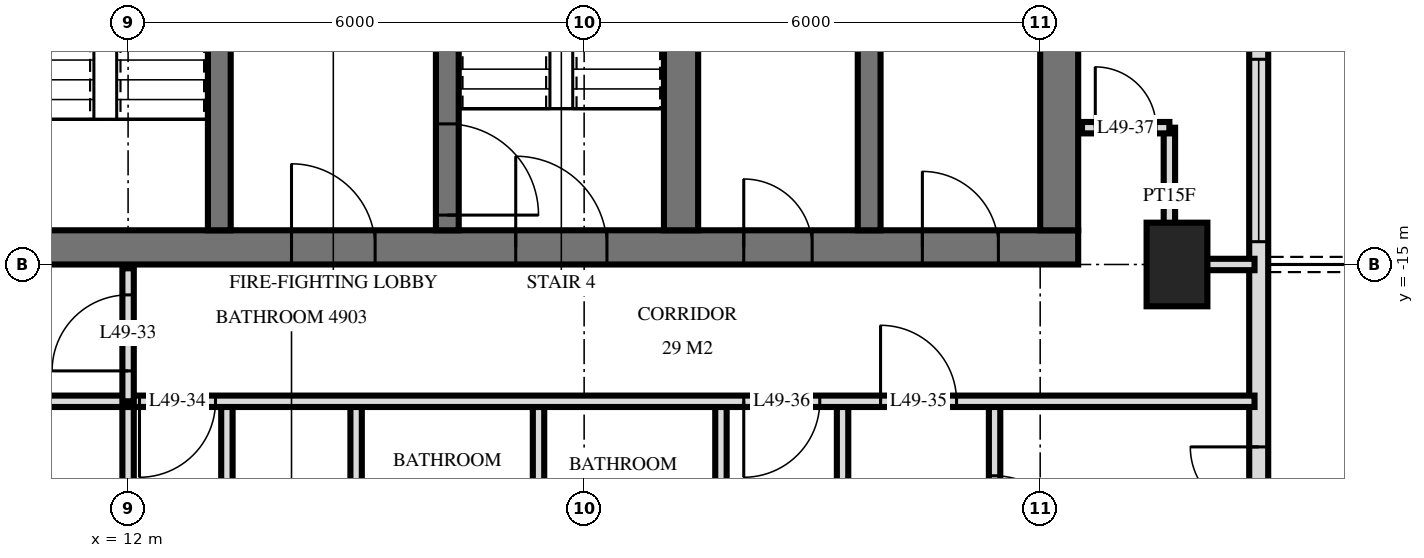
"""IFC4 building model, lengths in metres.
Left out: names, types, materials, properties, quantities, classifications, styles, units other than length and angle.
Written with IfcOpenShell. Run it as: python <this file> out.ifc"""

import sys

from ifc_helpers import new_model, si_unit, direction, frame, frame_2d, origin, origin_2d, place, context, subcontext, project, spatial, rectangle, extrude, element, fill, save


model = new_model("IFC4")
c1 = context("Model", 3, precision=1e-05, world=origin(), true_north=direction((0.0, 1.0)))
c2 = subcontext(c1, "Body", "Model", "MODEL_VIEW")
j1 = project(units=[si_unit("LENGTHUNIT", "METRE"), si_unit("PLANEANGLEUNIT", "RADIAN")], contexts=[c1])
p1 = place(None, origin())
s1 = spatial("IfcSite", under=j1, at=p1, CompositionType="ELEMENT")
p2 = place(p1, origin())
s2 = spatial("IfcBuilding", under=s1, at=p2, CompositionType="ELEMENT")
p3 = place(p2, frame((0.0, 0.0, 190.6)))
s3 = spatial("IfcBuildingStorey", under=s2, at=p3, CompositionType="ELEMENT", Elevation=190.6)
p4 = place(p3, frame((25.8, -15.0, 0.0), z_axis=(0.0, 0.0, 1.0), x_axis=(0.0, 1.0, 0.0)))
e1 = element("IfcColumn", 1, at=p4, inside=s3, PredefinedType="COLUMN", context=c2, shape_type="SweptSolid", body=[
    extrude(rectangle(XDim=1.1, YDim=0.8, at=origin_2d()), origin(), (0.0, 0.0, 1.0), 3.5),
])
p5 = place(p3, frame((10.0, -14.775, 0.0), z_axis=(0.0, 0.0, 1.0), x_axis=(1.0, 0.0, 0.0)))
e2 = element("IfcWall", 2, at=p5, inside=s3, PredefinedType="SHEAR", context=c2, shape_type="SweptSolid", body=[
    extrude(rectangle(XDim=14.5, YDim=0.45, at=frame_2d((7.25, 0.0))), origin(), (0.0, 0.0, 1.0), 3.5),
])
p6 = place(p5, frame((7.1, 0.0, 0.0)))
e3 = element("IfcOpeningElement", 3, at=p6, cuts=e2, PredefinedType="OPENING", context=c2, shape_type="SweptSolid", body=[
    extrude(rectangle(XDim=1.2, YDim=2.1, at=frame_2d((0.6, 1.05))), frame((0.0, 0.235, 0.0), z_axis=(0.0, -1.0, 0.0), x_axis=(1.0, 0.0, 0.0)), (0.0, 0.0, 1.0), 0.47),
])
p7 = place(p5, frame((4.15, 0.0, 0.0)))
e4 = element("IfcOpeningElement", 4, at=p7, cuts=e2, PredefinedType="OPENING", context=c2, shape_type="SweptSolid", body=[
    extrude(rectangle(XDim=1.1, YDim=2.1, at=frame_2d((0.55, 1.05))), frame((0.0, 0.235, 0.0), z_axis=(0.0, -1.0, 0.0), x_axis=(1.0, 0.0, 0.0)), (0.0, 0.0, 1.0), 0.47),
])
p8 = place(p5, frame((10.1, 0.0, 0.0)))
e5 = element("IfcOpeningElement", 5, at=p8, cuts=e2, PredefinedType="OPENING", context=c2, shape_type="SweptSolid", body=[
    extrude(rectangle(XDim=0.9, YDim=2.1, at=frame_2d((0.45, 1.05))), frame((0.0, 0.235, 0.0), z_axis=(0.0, -1.0, 0.0), x_axis=(1.0, 0.0, 0.0)), (0.0, 0.0, 1.0), 0.47),
])
p9 = place(p5, frame((12.45, 0.0, 0.0)))
e6 = element("IfcOpeningElement", 6, at=p9, cuts=e2, PredefinedType="OPENING", context=c2, shape_type="SweptSolid", body=[
    extrude(rectangle(XDim=1.0, YDim=2.1, at=frame_2d((0.5, 1.05))), frame((0.0, 0.235, 0.0), z_axis=(0.0, -1.0, 0.0), x_axis=(1.0, 0.0, 0.0)), (0.0, 0.0, 1.0), 0.47),
])
p10 = place(p3, frame((24.25, -14.55, 0.0), z_axis=(0.0, 0.0, 1.0), x_axis=(0.0, 1.0, 0.0)))
e7 = element("IfcWall", 7, at=p10, inside=s3, PredefinedType="SHEAR", context=c2, shape_type="SweptSolid", body=[
    extrude(rectangle(XDim=14.1, YDim=0.5, at=frame_2d((7.05, 0.0))), origin(), (0.0, 0.0, 1.0), 3.5),
])
p11 = place(p3, frame((13.2, -14.55, 0.0), z_axis=(0.0, 0.0, 1.0), x_axis=(0.0, 1.0, 0.0)))
e8 = element("IfcWall", 8, at=p11, inside=s3, PredefinedType="SHEAR", context=c2, shape_type="SweptSolid", body=[
    extrude(rectangle(XDim=5.4, YDim=0.3, at=frame_2d((2.7, 0.0))), origin(), (0.0, 0.0, 1.0), 3.5),
])
p12 = place(p11, frame((4.0, 0.0, 0.0)))
e9 = element("IfcOpeningElement", 9, at=p12, cuts=e8, PredefinedType="OPENING", context=c2, shape_type="SweptSolid", body=[
    extrude(rectangle(XDim=1.2, YDim=2.1, at=frame_2d((0.6, 1.05))), frame((0.0, 0.16, 0.0), z_axis=(0.0, -1.0, 0.0), x_axis=(1.0, 0.0, 0.0)), (0.0, 0.0, 1.0), 0.32),
])
p13 = place(p3, frame((16.2, -14.55, 0.0), z_axis=(0.0, 0.0, 1.0), x_axis=(0.0, 1.0, 0.0)))
e10 = element("IfcWall", 10, at=p13, inside=s3, PredefinedType="SHEAR", context=c2, shape_type="SweptSolid", body=[
    extrude(rectangle(XDim=5.4, YDim=0.3, at=frame_2d((2.7, 0.0))), origin(), (0.0, 0.0, 1.0), 3.5),
])
p14 = place(p13, frame((0.2, 0.0, 0.0)))
e11 = element("IfcOpeningElement", 11, at=p14, cuts=e10, PredefinedType="OPENING", context=c2, shape_type="SweptSolid", body=[
    extrude(rectangle(XDim=1.2, YDim=2.1, at=frame_2d((0.6, 1.05))), frame((0.0, 0.16, 0.0), z_axis=(0.0, -1.0, 0.0), x_axis=(1.0, 0.0, 0.0)), (0.0, 0.0, 1.0), 0.32),
])
p15 = place(p3, frame((19.275, -14.55, 0.0), z_axis=(0.0, 0.0, 1.0), x_axis=(0.0, 1.0, 0.0)))
e12 = element("IfcWall", 12, at=p15, inside=s3, PredefinedType="SHEAR", context=c2, shape_type="SweptSolid", body=[
    extrude(rectangle(XDim=5.4, YDim=0.45, at=frame_2d((2.7, 0.0))), origin(), (0.0, 0.0, 1.0), 3.5),
])
p16 = place(p3, frame((21.75, -14.55, 0.0), z_axis=(0.0, 0.0, 1.0), x_axis=(0.0, 1.0, 0.0)))
e13 = element("IfcWall", 13, at=p16, inside=s3, PredefinedType="SHEAR", context=c2, shape_type="SweptSolid", body=[
    extrude(rectangle(XDim=5.4, YDim=0.3, at=frame_2d((2.7, 0.0))), origin(), (0.0, 0.0, 1.0), 3.5),
])
p17 = place(p3, frame((26.875, -24.875, 0.0), z_axis=(0.0, 0.0, 1.0), x_axis=(0.0, 1.0, 0.0)))
e14 = element("IfcWall", 14, at=p17, inside=s3, PredefinedType="SOLIDWALL", context=c2, shape_type="SweptSolid", body=[
    extrude(rectangle(XDim=21.551, YDim=0.25, at=frame_2d((10.775, 0.0))), origin(), (0.0, 0.0, 1.0), 3.22),
])
p18 = place(p17, frame((0.575, 0.0, 0.0)))
e15 = element("IfcOpeningElement", 15, at=p18, cuts=e14, PredefinedType="OPENING", context=c2, shape_type="SweptSolid", body=[
    extrude(rectangle(XDim=1.8, YDim=2.4, at=frame_2d((0.9, 1.2))), frame((0.0, 0.135, 0.0), z_axis=(0.0, -1.0, 0.0), x_axis=(1.0, 0.0, 0.0)), (0.0, 0.0, 1.0), 0.27),
])
p19 = place(p17, frame((5.675, 0.0, 0.0)))
e16 = element("IfcOpeningElement", 16, at=p19, cuts=e14, PredefinedType="OPENING", context=c2, shape_type="SweptSolid", body=[
    extrude(rectangle(XDim=1.8, YDim=2.4, at=frame_2d((0.9, 1.2))), frame((0.0, 0.135, 0.0), z_axis=(0.0, -1.0, 0.0), x_axis=(1.0, 0.0, 0.0)), (0.0, 0.0, 1.0), 0.27),
])
p20 = place(p17, frame((10.175, 0.0, 0.9)))
e17 = element("IfcOpeningElement", 17, at=p20, cuts=e14, PredefinedType="OPENING", context=c2, shape_type="SweptSolid", body=[
    extrude(rectangle(XDim=2.4, YDim=1.5, at=frame_2d((1.2, 0.75))), frame((0.0, 0.135, 0.0), z_axis=(0.0, -1.0, 0.0), x_axis=(1.0, 0.0, 0.0)), (0.0, 0.0, 1.0), 0.27),
])
p21 = place(p17, frame((13.475, 0.0, 0.0)))
e18 = element("IfcOpeningElement", 18, at=p21, cuts=e14, PredefinedType="OPENING", context=c2, shape_type="SweptSolid", body=[
    extrude(rectangle(XDim=1.8, YDim=2.4, at=frame_2d((0.9, 1.2))), frame((0.0, 0.135, 0.0), z_axis=(0.0, -1.0, 0.0), x_axis=(1.0, 0.0, 0.0)), (0.0, 0.0, 1.0), 0.27),
])
p22 = place(p3, frame((25.7, -15.0, 0.0), z_axis=(0.0, 0.0, 1.0), x_axis=(0.0, 1.0, 0.0)))
e19 = element("IfcWall", 19, at=p22, inside=s3, PredefinedType="PARTITIONING", context=c2, shape_type="SweptSolid", body=[
    extrude(rectangle(XDim=1.8, YDim=0.15, at=frame_2d((0.9, 0.0))), origin(), (0.0, 0.0, 1.0), 3.22),
])
p23 = place(p3, frame((23.4, -19.8, 0.0), z_axis=(0.0, 0.0, 1.0), x_axis=(0.0, 1.0, 0.0)))
e20 = element("IfcWall", 20, at=p23, inside=s3, PredefinedType="PARTITIONING", context=c2, shape_type="SweptSolid", body=[
    extrude(rectangle(XDim=3.0, YDim=0.15, at=frame_2d((1.5, 0.0))), origin(), (0.0, 0.0, 1.0), 3.22),
])
p24 = place(p23, frame((1.02, 0.0, 0.0)))
e21 = element("IfcOpeningElement", 21, at=p24, cuts=e20, PredefinedType="OPENING", context=c2, shape_type="SweptSolid", body=[
    extrude(rectangle(XDim=1.0, YDim=2.1, at=frame_2d((0.5, 1.05))), frame((0.0, 0.085, 0.0), z_axis=(0.0, -1.0, 0.0), x_axis=(1.0, 0.0, 0.0)), (0.0, 0.0, 1.0), 0.17),
])
for number, where, z_axis, x_axis in (
    (22, (21.4, -19.8, 0.0), (0.0, 0.0, 1.0), (0.0, 1.0, 0.0)),
    (23, (19.8, -19.8, 0.0), (0.0, 0.0, 1.0), (0.0, 1.0, 0.0)),
    (24, (17.4, -19.8, 0.0), (0.0, 0.0, 1.0), (0.0, 1.0, 0.0)),
):
    element("IfcWall", number, at=place(p3, frame(where, z_axis=z_axis, x_axis=x_axis)), inside=s3, PredefinedType="PARTITIONING", context=c2, shape_type="SweptSolid", body=[
        extrude(rectangle(XDim=3.0, YDim=0.15, at=frame_2d((1.5, 0.0))), origin(), (0.0, 0.0, 1.0), 3.22),
    ])
p25 = place(p3, frame((15.0, -29.22, 0.0), z_axis=(0.0, 0.0, 1.0), x_axis=(0.0, 1.0, 0.0)))
e25 = element("IfcWall", 25, at=p25, inside=s3, PredefinedType="PARTITIONING", context=c2, shape_type="SweptSolid", body=[
    extrude(rectangle(XDim=12.42, YDim=0.15, at=frame_2d((6.21, 0.0))), origin(), (0.0, 0.0, 1.0), 3.22),
])
p26 = place(p3, frame((13.3, -19.8, 0.0), z_axis=(0.0, 0.0, 1.0), x_axis=(0.0, 1.0, 0.0)))
e26 = element("IfcWall", 26, at=p26, inside=s3, PredefinedType="PARTITIONING", context=c2, shape_type="SweptSolid", body=[
    extrude(rectangle(XDim=3.0, YDim=0.15, at=frame_2d((1.5, 0.0))), origin(), (0.0, 0.0, 1.0), 3.22),
])
p27 = place(p26, frame((1.1, 0.0, 0.0)))
e27 = element("IfcOpeningElement", 27, at=p27, cuts=e26, PredefinedType="OPENING", context=c2, shape_type="SweptSolid", body=[
    extrude(rectangle(XDim=0.8, YDim=2.1, at=frame_2d((0.4, 1.05))), frame((0.0, 0.085, 0.0), z_axis=(0.0, -1.0, 0.0), x_axis=(1.0, 0.0, 0.0)), (0.0, 0.0, 1.0), 0.17),
])
p28 = place(p3, frame((12.0, -16.8, 0.0), z_axis=(0.0, 0.0, 1.0), x_axis=(0.0, 1.0, 0.0)))
e28 = element("IfcWall", 28, at=p28, inside=s3, PredefinedType="PARTITIONING", context=c2, shape_type="SweptSolid", body=[
    extrude(rectangle(XDim=1.75, YDim=0.15, at=frame_2d((0.875, 0.0))), origin(), (0.0, 0.0, 1.0), 3.22),
])
p29 = place(p28, frame((0.4, 0.0, 0.0)))
e29 = element("IfcOpeningElement", 29, at=p29, cuts=e28, PredefinedType="OPENING", context=c2, shape_type="SweptSolid", body=[
    extrude(rectangle(XDim=1.0, YDim=2.1, at=frame_2d((0.5, 1.05))), frame((0.0, 0.085, 0.0), z_axis=(0.0, -1.0, 0.0), x_axis=(1.0, 0.0, 0.0)), (0.0, 0.0, 1.0), 0.17),
])
p30 = place(p3, frame((12.0, -29.22, 0.0), z_axis=(0.0, 0.0, 1.0), x_axis=(0.0, 1.0, 0.0)))
e30 = element("IfcWall", 30, at=p30, inside=s3, PredefinedType="PARTITIONING", context=c2, shape_type="SweptSolid", body=[
    extrude(rectangle(XDim=12.42, YDim=0.15, at=frame_2d((6.21, 0.0))), origin(), (0.0, 0.0, 1.0), 3.22),
])
p31 = place(p3, frame((-26.82, -16.8, 0.0), z_axis=(0.0, 0.0, 1.0), x_axis=(1.0, 0.0, 0.0)))
e31 = element("IfcWall", 31, at=p31, inside=s3, PredefinedType="PARTITIONING", context=c2, shape_type="SweptSolid", body=[
    extrude(rectangle(XDim=53.64, YDim=0.15, at=frame_2d((26.82, 0.0))), origin(), (0.0, 0.0, 1.0), 3.22),
])
p32 = place(p31, frame((11.97, 0.0, 0.0)))
e32 = element("IfcOpeningElement", 32, at=p32, cuts=e31, PredefinedType="OPENING", context=c2, shape_type="SweptSolid", body=[
    extrude(rectangle(XDim=1.0, YDim=2.1, at=frame_2d((0.5, 1.05))), frame((0.0, 0.085, 0.0), z_axis=(0.0, -1.0, 0.0), x_axis=(1.0, 0.0, 0.0)), (0.0, 0.0, 1.0), 0.17),
])
p33 = place(p31, frame((10.67, 0.0, 0.0)))
e33 = element("IfcOpeningElement", 33, at=p33, cuts=e31, PredefinedType="OPENING", context=c2, shape_type="SweptSolid", body=[
    extrude(rectangle(XDim=1.0, YDim=2.1, at=frame_2d((0.5, 1.05))), frame((0.0, 0.085, 0.0), z_axis=(0.0, -1.0, 0.0), x_axis=(1.0, 0.0, 0.0)), (0.0, 0.0, 1.0), 0.17),
])
p34 = place(p31, frame((3.22, 0.0, 0.0)))
e34 = element("IfcOpeningElement", 34, at=p34, cuts=e31, PredefinedType="OPENING", context=c2, shape_type="SweptSolid", body=[
    extrude(rectangle(XDim=1.0, YDim=2.1, at=frame_2d((0.5, 1.05))), frame((0.0, 0.085, 0.0), z_axis=(0.0, -1.0, 0.0), x_axis=(1.0, 0.0, 0.0)), (0.0, 0.0, 1.0), 0.17),
])
p35 = place(p31, frame((5.02, 0.0, 0.0)))
e35 = element("IfcOpeningElement", 35, at=p35, cuts=e31, PredefinedType="OPENING", context=c2, shape_type="SweptSolid", body=[
    extrude(rectangle(XDim=1.0, YDim=2.1, at=frame_2d((0.5, 1.05))), frame((0.0, 0.085, 0.0), z_axis=(0.0, -1.0, 0.0), x_axis=(1.0, 0.0, 0.0)), (0.0, 0.0, 1.0), 0.17),
])
p36 = place(p31, frame((38.97, 0.0, 0.0)))
e36 = element("IfcOpeningElement", 36, at=p36, cuts=e31, PredefinedType="OPENING", context=c2, shape_type="SweptSolid", body=[
    extrude(rectangle(XDim=1.0, YDim=2.1, at=frame_2d((0.5, 1.05))), frame((0.0, 0.085, 0.0), z_axis=(0.0, -1.0, 0.0), x_axis=(1.0, 0.0, 0.0)), (0.0, 0.0, 1.0), 0.17),
])
p37 = place(p31, frame((48.72, 0.0, 0.0)))
e37 = element("IfcOpeningElement", 37, at=p37, cuts=e31, PredefinedType="OPENING", context=c2, shape_type="SweptSolid", body=[
    extrude(rectangle(XDim=1.0, YDim=2.1, at=frame_2d((0.5, 1.05))), frame((0.0, 0.085, 0.0), z_axis=(0.0, -1.0, 0.0), x_axis=(1.0, 0.0, 0.0)), (0.0, 0.0, 1.0), 0.17),
])
p38 = place(p31, frame((46.92, 0.0, 0.0)))
e38 = element("IfcOpeningElement", 38, at=p38, cuts=e31, PredefinedType="OPENING", context=c2, shape_type="SweptSolid", body=[
    extrude(rectangle(XDim=1.0, YDim=2.1, at=frame_2d((0.5, 1.05))), frame((0.0, 0.085, 0.0), z_axis=(0.0, -1.0, 0.0), x_axis=(1.0, 0.0, 0.0)), (0.0, 0.0, 1.0), 0.17),
])
p39 = place(p31, frame((18.32, 0.0, 0.0)))
e39 = element("IfcOpeningElement", 39, at=p39, cuts=e31, PredefinedType="OPENING", context=c2, shape_type="SweptSolid", body=[
    extrude(rectangle(XDim=1.0, YDim=2.1, at=frame_2d((0.5, 1.05))), frame((0.0, 0.085, 0.0), z_axis=(0.0, -1.0, 0.0), x_axis=(1.0, 0.0, 0.0)), (0.0, 0.0, 1.0), 0.17),
])
p40 = place(p31, frame((26.32, 0.0, 0.0)))
e40 = element("IfcOpeningElement", 40, at=p40, cuts=e31, PredefinedType="OPENING", context=c2, shape_type="SweptSolid", body=[
    extrude(rectangle(XDim=1.0, YDim=2.1, at=frame_2d((0.5, 1.05))), frame((0.0, 0.085, 0.0), z_axis=(0.0, -1.0, 0.0), x_axis=(1.0, 0.0, 0.0)), (0.0, 0.0, 1.0), 0.17),
])
p41 = place(p31, frame((34.32, 0.0, 0.0)))
e41 = element("IfcOpeningElement", 41, at=p41, cuts=e31, PredefinedType="OPENING", context=c2, shape_type="SweptSolid", body=[
    extrude(rectangle(XDim=1.0, YDim=2.1, at=frame_2d((0.5, 1.05))), frame((0.0, 0.085, 0.0), z_axis=(0.0, -1.0, 0.0), x_axis=(1.0, 0.0, 0.0)), (0.0, 0.0, 1.0), 0.17),
])
p42 = place(p3, frame((25.7, -15.0, 0.0), z_axis=(0.0, 0.0, 1.0), x_axis=(1.0, 0.0, 0.0)))
e42 = element("IfcWall", 42, at=p42, inside=s3, PredefinedType="PARTITIONING", context=c2, shape_type="SweptSolid", body=[
    extrude(rectangle(XDim=1.12, YDim=0.15, at=frame_2d((0.56, 0.0))), origin(), (0.0, 0.0, 1.0), 3.22),
])
p43 = place(p3, frame((24.55, -13.2, 0.0), z_axis=(0.0, 0.0, 1.0), x_axis=(1.0, 0.0, 0.0)))
e43 = element("IfcWall", 43, at=p43, inside=s3, PredefinedType="PARTITIONING", context=c2, shape_type="SweptSolid", body=[
    extrude(rectangle(XDim=1.15, YDim=0.15, at=frame_2d((0.575, 0.0))), origin(), (0.0, 0.0, 1.0), 3.22),
])
p44 = place(p43, frame((0.175, 0.0, 0.0)))
e44 = element("IfcOpeningElement", 44, at=p44, cuts=e43, PredefinedType="OPENING", context=c2, shape_type="SweptSolid", body=[
    extrude(rectangle(XDim=0.8, YDim=2.1, at=frame_2d((0.4, 1.05))), frame((0.0, 0.085, 0.0), z_axis=(0.0, -1.0, 0.0), x_axis=(1.0, 0.0, 0.0)), (0.0, 0.0, 1.0), 0.17),
])
p45 = place(p19, origin())
e45 = element("IfcDoor", 45, at=p45, inside=s3, OperationType="DOUBLE_DOOR_SINGLE_SWING", PredefinedType="DOOR", context=c2, shape_type="SweptSolid", body=[
    extrude(rectangle(XDim=1.8, YDim=2.4, at=frame_2d((0.9, 1.2))), frame((0.0, 0.025, 0.0), z_axis=(0.0, -1.0, 0.0), x_axis=(1.0, 0.0, 0.0)), (0.0, 0.0, 1.0), 0.05),
])
fill(e16, e45)
p46 = place(p20, origin())
e46 = element("IfcWindow", 46, at=p46, inside=s3, PartitioningType="SINGLE_PANEL", PredefinedType="WINDOW", context=c2, shape_type="SweptSolid", body=[
    extrude(rectangle(XDim=2.4, YDim=1.5, at=frame_2d((1.2, 0.75))), frame((0.0, 0.03, 0.0), z_axis=(0.0, -1.0, 0.0), x_axis=(1.0, 0.0, 0.0)), (0.0, 0.0, 1.0), 0.06),
])
fill(e17, e46)
p47 = place(p6, origin())
e47 = element("IfcDoor", 47, at=p47, inside=s3, OperationType="SINGLE_SWING_RIGHT", PredefinedType="DOOR", context=c2, shape_type="SweptSolid", body=[
    extrude(rectangle(XDim=1.2, YDim=2.1, at=frame_2d((0.6, 1.05))), frame((0.0, 0.025, 0.0), z_axis=(0.0, -1.0, 0.0), x_axis=(1.0, 0.0, 0.0)), (0.0, 0.0, 1.0), 0.05),
])
fill(e3, e47)
p48 = place(p7, origin())
e48 = element("IfcDoor", 48, at=p48, inside=s3, OperationType="SINGLE_SWING_RIGHT", PredefinedType="DOOR", context=c2, shape_type="SweptSolid", body=[
    extrude(rectangle(XDim=1.1, YDim=2.1, at=frame_2d((0.55, 1.05))), frame((0.0, 0.025, 0.0), z_axis=(0.0, -1.0, 0.0), x_axis=(1.0, 0.0, 0.0)), (0.0, 0.0, 1.0), 0.05),
])
fill(e4, e48)
p49 = place(p8, origin())
e49 = element("IfcDoor", 49, at=p49, inside=s3, OperationType="SINGLE_SWING_RIGHT", PredefinedType="DOOR", context=c2, shape_type="SweptSolid", body=[
    extrude(rectangle(XDim=0.9, YDim=2.1, at=frame_2d((0.45, 1.05))), frame((0.0, 0.025, 0.0), z_axis=(0.0, -1.0, 0.0), x_axis=(1.0, 0.0, 0.0)), (0.0, 0.0, 1.0), 0.05),
])
fill(e5, e49)
p50 = place(p9, origin())
e50 = element("IfcDoor", 50, at=p50, inside=s3, OperationType="SINGLE_SWING_RIGHT", PredefinedType="DOOR", context=c2, shape_type="SweptSolid", body=[
    extrude(rectangle(XDim=1.0, YDim=2.1, at=frame_2d((0.5, 1.05))), frame((0.0, 0.025, 0.0), z_axis=(0.0, -1.0, 0.0), x_axis=(1.0, 0.0, 0.0)), (0.0, 0.0, 1.0), 0.05),
])
fill(e6, e50)
p51 = place(p14, frame((0.6, 0.0, 0.0), z_axis=(0.0, 0.0, 1.0), x_axis=(-1.0, 0.0, 0.0)))
e51 = element("IfcDoor", 51, at=p51, inside=s3, OperationType="SINGLE_SWING_LEFT", PredefinedType="DOOR", context=c2, shape_type="SweptSolid", body=[
    extrude(rectangle(XDim=1.2, YDim=2.1, at=frame_2d((0.0, 1.05))), frame((0.0, -0.025, 0.0), z_axis=(0.0, 1.0, 0.0), x_axis=(-1.0, 0.0, 0.0)), (0.0, 0.0, 1.0), 0.05),
])
fill(e11, e51)
p52 = place(p29, origin())
e52 = element("IfcDoor", 52, at=p52, inside=s3, OperationType="SINGLE_SWING_RIGHT", PredefinedType="DOOR", context=c2, shape_type="SweptSolid", body=[
    extrude(rectangle(XDim=1.0, YDim=2.1, at=frame_2d((0.5, 1.05))), frame((0.0, 0.025, 0.0), z_axis=(0.0, -1.0, 0.0), x_axis=(1.0, 0.0, 0.0)), (0.0, 0.0, 1.0), 0.05),
])
fill(e29, e52)
p53 = place(p36, frame((0.5, 0.0, 0.0), z_axis=(0.0, 0.0, 1.0), x_axis=(-1.0, 0.0, 0.0)))
e53 = element("IfcDoor", 53, at=p53, inside=s3, OperationType="SINGLE_SWING_LEFT", PredefinedType="DOOR", context=c2, shape_type="SweptSolid", body=[
    extrude(rectangle(XDim=1.0, YDim=2.1, at=frame_2d((0.0, 1.05))), frame((0.0, -0.025, 0.0), z_axis=(0.0, 1.0, 0.0), x_axis=(-1.0, 0.0, 0.0)), (0.0, 0.0, 1.0), 0.05),
])
fill(e36, e53)
p54 = place(p37, origin())
e54 = element("IfcDoor", 54, at=p54, inside=s3, OperationType="SINGLE_SWING_RIGHT", PredefinedType="DOOR", context=c2, shape_type="SweptSolid", body=[
    extrude(rectangle(XDim=1.0, YDim=2.1, at=frame_2d((0.5, 1.05))), frame((0.0, 0.025, 0.0), z_axis=(0.0, -1.0, 0.0), x_axis=(1.0, 0.0, 0.0)), (0.0, 0.0, 1.0), 0.05),
])
fill(e37, e54)
p55 = place(p38, frame((0.5, 0.0, 0.0), z_axis=(0.0, 0.0, 1.0), x_axis=(-1.0, 0.0, 0.0)))
e55 = element("IfcDoor", 55, at=p55, inside=s3, OperationType="SINGLE_SWING_LEFT", PredefinedType="DOOR", context=c2, shape_type="SweptSolid", body=[
    extrude(rectangle(XDim=1.0, YDim=2.1, at=frame_2d((0.0, 1.05))), frame((0.0, -0.025, 0.0), z_axis=(0.0, 1.0, 0.0), x_axis=(-1.0, 0.0, 0.0)), (0.0, 0.0, 1.0), 0.05),
])
fill(e38, e55)
p56 = place(p44, origin())
e56 = element("IfcDoor", 56, at=p56, inside=s3, OperationType="SINGLE_SWING_RIGHT", PredefinedType="DOOR", context=c2, shape_type="SweptSolid", body=[
    extrude(rectangle(XDim=0.8, YDim=2.1, at=frame_2d((0.4, 1.05))), frame((0.0, 0.025, 0.0), z_axis=(0.0, -1.0, 0.0), x_axis=(1.0, 0.0, 0.0)), (0.0, 0.0, 1.0), 0.05),
])
fill(e44, e56)
p57 = place(p24, frame((0.5, 0.0, 0.0), z_axis=(0.0, 0.0, 1.0), x_axis=(-1.0, 0.0, 0.0)))
e57 = element("IfcDoor", 57, at=p57, inside=s3, OperationType="SINGLE_SWING_LEFT", PredefinedType="DOOR", context=c2, shape_type="SweptSolid", body=[
    extrude(rectangle(XDim=1.0, YDim=2.1, at=frame_2d((0.0, 1.05))), frame((0.0, -0.025, 0.0), z_axis=(0.0, 1.0, 0.0), x_axis=(-1.0, 0.0, 0.0)), (0.0, 0.0, 1.0), 0.05),
])
fill(e21, e57)
save(model, sys.argv[1])
